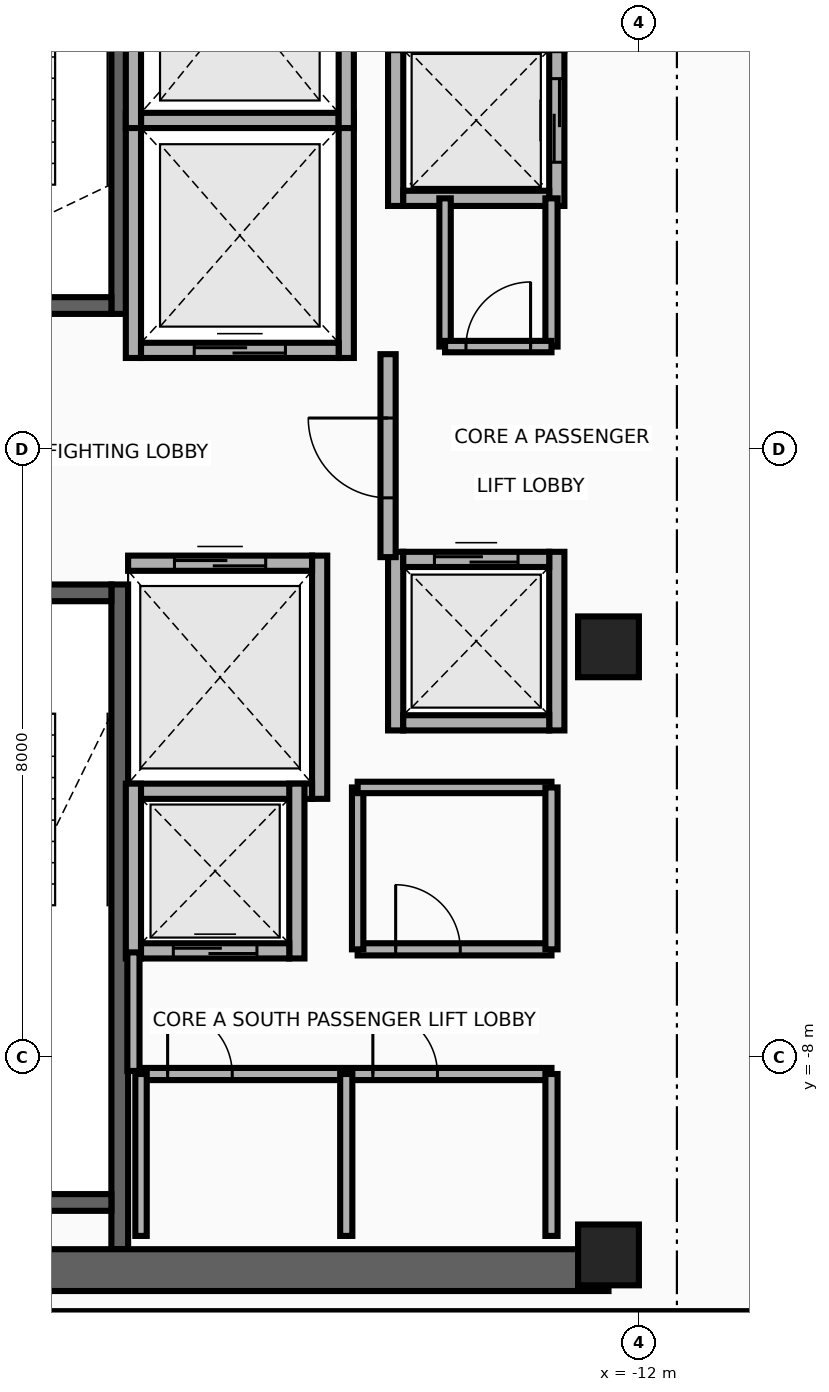
"""IFC4 building model, lengths in metres.
Left out: names, types, materials, properties, quantities, classifications, styles, units other than length and angle.
Written with IfcOpenShell. Run it as: python <this file> out.ifc"""

import sys

from ifc_helpers import new_model, si_unit, direction, frame, frame_2d, origin, origin_2d, place, context, subcontext, project, spatial, rectangle, extrude, source, transform, mapped, element, fill, save


model = new_model("IFC4")
c1 = context("Model", 3, precision=1e-05, world=origin(), true_north=direction((0.0, 1.0)))
c2 = subcontext(c1, "Body", "Model", "MODEL_VIEW")
j1 = project(units=[si_unit("LENGTHUNIT", "METRE"), si_unit("PLANEANGLEUNIT", "RADIAN")], contexts=[c1])
p1 = place(None, origin())
s1 = spatial("IfcSite", under=j1, at=p1, CompositionType="ELEMENT")
p2 = place(p1, origin())
s2 = spatial("IfcBuilding", under=s1, at=p2, CompositionType="ELEMENT")
p3 = place(p2, frame((0.0, 0.0, 266.0)))
s3 = spatial("IfcBuildingStorey", under=s2, at=p3, CompositionType="ELEMENT", Elevation=266.0)
p4 = place(p3, frame((-18.83, 1.78, 0.0), z_axis=(0.0, 0.0, 1.0), x_axis=(0.0, 1.0, 0.0)))
e1 = element("IfcWall", 1, at=p4, inside=s3, PredefinedType="SHEAR", context=c2, shape_type="SweptSolid", body=[
    extrude(rectangle(XDim=8.745, YDim=0.22, at=frame_2d((4.373, 0.0))), origin(), (0.0, 0.0, 1.0), 3.26),
])
p5 = place(p3, frame((-22.05, 1.89, 0.0), z_axis=(0.0, 0.0, 1.0), x_axis=(1.0, 0.0, 0.0)))
e2 = element("IfcWall", 2, at=p5, inside=s3, PredefinedType="SHEAR", context=c2, shape_type="SweptSolid", body=[
    extrude(rectangle(XDim=3.11, YDim=0.22, at=frame_2d((1.555, 0.0))), origin(), (0.0, 0.0, 1.0), 3.26),
])
p6 = place(p5, frame((1.0, 0.0, 0.0)))
e3 = element("IfcOpeningElement", 3, at=p6, cuts=e2, PredefinedType="OPENING", context=c2, shape_type="SweptSolid", body=[
    extrude(rectangle(XDim=1.1, YDim=2.15, at=frame_2d((0.55, 1.075))), frame((0.0, 0.125, 0.0), z_axis=(0.0, -1.0, 0.0), x_axis=(1.0, 0.0, 0.0)), (0.0, 0.0, 1.0), 0.25),
])
p7 = place(p3, frame((-18.83, -10.525, 0.0), z_axis=(0.0, 0.0, 1.0), x_axis=(0.0, 1.0, 0.0)))
e4 = element("IfcWall", 4, at=p7, inside=s3, PredefinedType="SHEAR", context=c2, shape_type="SweptSolid", body=[
    extrude(rectangle(XDim=8.745, YDim=0.22, at=frame_2d((4.373, 0.0))), origin(), (0.0, 0.0, 1.0), 3.26),
])
p8 = place(p3, frame((-22.05, -9.91, 0.0), z_axis=(0.0, 0.0, 1.0), x_axis=(1.0, 0.0, 0.0)))
e5 = element("IfcWall", 5, at=p8, inside=s3, PredefinedType="SHEAR", context=c2, shape_type="SweptSolid", body=[
    extrude(rectangle(XDim=3.11, YDim=0.22, at=frame_2d((1.555, 0.0))), origin(), (0.0, 0.0, 1.0), 3.26),
])
p9 = place(p3, frame((-22.05, -1.89, 0.0), z_axis=(0.0, 0.0, 1.0), x_axis=(1.0, 0.0, 0.0)))
e6 = element("IfcWall", 6, at=p9, inside=s3, PredefinedType="SHEAR", context=c2, shape_type="SweptSolid", body=[
    extrude(rectangle(XDim=3.11, YDim=0.22, at=frame_2d((1.555, 0.0))), origin(), (0.0, 0.0, 1.0), 3.26),
])
p10 = place(p9, frame((1.0, 0.0, 0.0)))
e7 = element("IfcOpeningElement", 7, at=p10, cuts=e6, PredefinedType="OPENING", context=c2, shape_type="SweptSolid", body=[
    extrude(rectangle(XDim=1.1, YDim=2.15, at=frame_2d((0.55, 1.075))), frame((0.0, 0.125, 0.0), z_axis=(0.0, -1.0, 0.0), x_axis=(1.0, 0.0, 0.0)), (0.0, 0.0, 1.0), 0.25),
])
p11 = place(p3, frame((-22.65, -10.8, 0.0), z_axis=(0.0, 0.0, 1.0), x_axis=(1.0, 0.0, 0.0)))
e8 = element("IfcWall", 8, at=p11, inside=s3, PredefinedType="SHEAR", context=c2, shape_type="SweptSolid", body=[
    extrude(rectangle(XDim=10.25, YDim=0.55, at=frame_2d((5.125, 0.0))), origin(), (0.0, 0.0, 1.0), 3.26),
])
m1 = source(origin(), c2, "Body", "SweptSolid", [
    extrude(rectangle(XDim=0.8, YDim=0.8, at=origin_2d()), origin(), (0.0, 0.0, 1.0), 3.5),
])
for number, where, z_axis, x_axis in (
    (9, (-12.4, -10.6, 0.0), (0.0, 0.0, 1.0), (1.0, 0.0, 0.0)),
    (10, (-12.4, -2.6, 0.0), (0.0, 0.0, 1.0), (1.0, 0.0, 0.0)),
):
    element("IfcColumn", number, at=place(p3, frame(where, z_axis=z_axis, x_axis=x_axis)), inside=s3, PredefinedType="COLUMN", context=c2, shape_type="MappedRepresentation", body=[
        mapped(m1, transform((0.0, 0.0, 0.0), x_axis=(1.0, 0.0, 0.0), y_axis=(0.0, 1.0, 0.0), z_axis=(0.0, 0.0, 1.0), scale=1.0)),
    ])
for number, where, z_axis, x_axis in (
    (11, (-18.65, 1.2, 0.0), (0.0, 0.0, 1.0), (0.0, 1.0, 0.0)),
    (12, (-15.85, 1.2, 0.0), (0.0, 0.0, 1.0), (0.0, 1.0, 0.0)),
):
    element("IfcWall", number, at=place(p3, frame(where, z_axis=z_axis, x_axis=x_axis)), inside=s3, PredefinedType="MOVABLE", context=c2, shape_type="SweptSolid", body=[
        extrude(rectangle(XDim=3.225, YDim=0.2, at=frame_2d((1.613, 0.0))), origin(), (0.0, 0.0, 1.0), 3.26),
    ])
p12 = place(p3, frame((-18.55, 1.3, 0.0), z_axis=(0.0, 0.0, 1.0), x_axis=(1.0, 0.0, 0.0)))
e13 = element("IfcWall", 13, at=p12, inside=s3, PredefinedType="MOVABLE", context=c2, shape_type="SweptSolid", body=[
    extrude(rectangle(XDim=2.6, YDim=0.2, at=frame_2d((1.3, 0.0))), origin(), (0.0, 0.0, 1.0), 3.26),
])
p13 = place(p12, frame((0.7, 0.0, 0.0)))
e14 = element("IfcOpeningElement", 14, at=p13, cuts=e13, PredefinedType="OPENING", context=c2, shape_type="SweptSolid", body=[
    extrude(rectangle(XDim=1.2, YDim=2.1, at=frame_2d((0.6, 1.05))), frame((0.0, 0.115, 0.0), z_axis=(0.0, -1.0, 0.0), x_axis=(1.0, 0.0, 0.0)), (0.0, 0.0, 1.0), 0.23),
])
p14 = place(p3, frame((-18.55, 4.325, 0.0), z_axis=(0.0, 0.0, 1.0), x_axis=(1.0, 0.0, 0.0)))
e15 = element("IfcWall", 15, at=p14, inside=s3, PredefinedType="MOVABLE", context=c2, shape_type="SweptSolid", body=[
    extrude(rectangle(XDim=2.6, YDim=0.2, at=frame_2d((1.3, 0.0))), origin(), (0.0, 0.0, 1.0), 3.26),
])
p15 = place(p3, frame((-16.2, -4.6, 0.0), z_axis=(0.0, 0.0, 1.0), x_axis=(0.0, 1.0, 0.0)))
e16 = element("IfcWall", 16, at=p15, inside=s3, PredefinedType="MOVABLE", context=c2, shape_type="SweptSolid", body=[
    extrude(rectangle(XDim=3.2, YDim=0.2, at=frame_2d((1.6, 0.0))), origin(), (0.0, 0.0, 1.0), 3.26),
])
p16 = place(p3, frame((-18.72, -4.5, 0.0), z_axis=(0.0, 0.0, 1.0), x_axis=(1.0, 0.0, 0.0)))
e17 = element("IfcWall", 17, at=p16, inside=s3, PredefinedType="MOVABLE", context=c2, shape_type="SweptSolid", body=[
    extrude(rectangle(XDim=2.42, YDim=0.2, at=frame_2d((1.21, 0.0))), origin(), (0.0, 0.0, 1.0), 3.26),
])
p17 = place(p3, frame((-18.72, -1.5, 0.0), z_axis=(0.0, 0.0, 1.0), x_axis=(1.0, 0.0, 0.0)))
e18 = element("IfcWall", 18, at=p17, inside=s3, PredefinedType="MOVABLE", context=c2, shape_type="SweptSolid", body=[
    extrude(rectangle(XDim=2.42, YDim=0.2, at=frame_2d((1.21, 0.0))), origin(), (0.0, 0.0, 1.0), 3.26),
])
p18 = place(p17, frame((0.61, 0.0, 0.0)))
e19 = element("IfcOpeningElement", 19, at=p18, cuts=e18, PredefinedType="OPENING", context=c2, shape_type="SweptSolid", body=[
    extrude(rectangle(XDim=1.2, YDim=2.1, at=frame_2d((0.6, 1.05))), frame((0.0, 0.115, 0.0), z_axis=(0.0, -1.0, 0.0), x_axis=(1.0, 0.0, 0.0)), (0.0, 0.0, 1.0), 0.23),
])
for number, where, z_axis, x_axis in (
    (20, (-18.65, 4.225, 0.0), (0.0, 0.0, 1.0), (0.0, 1.0, 0.0)),
    (21, (-15.85, 4.225, 0.0), (0.0, 0.0, 1.0), (0.0, 1.0, 0.0)),
):
    element("IfcWall", number, at=place(p3, frame(where, z_axis=z_axis, x_axis=x_axis)), inside=s3, PredefinedType="MOVABLE", context=c2, shape_type="SweptSolid", body=[
        extrude(rectangle(XDim=3.325, YDim=0.2, at=frame_2d((1.663, 0.0))), origin(), (0.0, 0.0, 1.0), 3.26),
    ])
p19 = place(p3, frame((-15.2, 3.2, 0.0), z_axis=(0.0, 0.0, 1.0), x_axis=(0.0, 1.0, 0.0)))
e22 = element("IfcWall", 22, at=p19, inside=s3, PredefinedType="MOVABLE", context=c2, shape_type="SweptSolid", body=[
    extrude(rectangle(XDim=2.25, YDim=0.2, at=frame_2d((1.125, 0.0))), origin(), (0.0, 0.0, 1.0), 3.26),
])
p20 = place(p3, frame((-13.08, 3.2, 0.0), z_axis=(0.0, 0.0, 1.0), x_axis=(0.0, 1.0, 0.0)))
e23 = element("IfcWall", 23, at=p20, inside=s3, PredefinedType="MOVABLE", context=c2, shape_type="SweptSolid", body=[
    extrude(rectangle(XDim=2.25, YDim=0.2, at=frame_2d((1.125, 0.0))), origin(), (0.0, 0.0, 1.0), 3.26),
])
p21 = place(p20, frame((0.575, 0.0, 0.0)))
e24 = element("IfcOpeningElement", 24, at=p21, cuts=e23, PredefinedType="OPENING", context=c2, shape_type="SweptSolid", body=[
    extrude(rectangle(XDim=1.1, YDim=2.1, at=frame_2d((0.55, 1.05))), frame((0.0, 0.115, 0.0), z_axis=(0.0, -1.0, 0.0), x_axis=(1.0, 0.0, 0.0)), (0.0, 0.0, 1.0), 0.23),
])
p22 = place(p3, frame((-15.1, 3.3, 0.0), z_axis=(0.0, 0.0, 1.0), x_axis=(1.0, 0.0, 0.0)))
e25 = element("IfcWall", 25, at=p22, inside=s3, PredefinedType="MOVABLE", context=c2, shape_type="SweptSolid", body=[
    extrude(rectangle(XDim=1.92, YDim=0.2, at=frame_2d((0.96, 0.0))), origin(), (0.0, 0.0, 1.0), 3.26),
])
for number, where, z_axis, x_axis in (
    (26, (-18.65, -6.7, 0.0), (0.0, 0.0, 1.0), (0.0, 1.0, 0.0)),
    (27, (-16.5, -6.7, 0.0), (0.0, 0.0, 1.0), (0.0, 1.0, 0.0)),
):
    element("IfcWall", number, at=place(p3, frame(where, z_axis=z_axis, x_axis=x_axis)), inside=s3, PredefinedType="MOVABLE", context=c2, shape_type="SweptSolid", body=[
        extrude(rectangle(XDim=2.3, YDim=0.2, at=frame_2d((1.15, 0.0))), origin(), (0.0, 0.0, 1.0), 3.26),
    ])
p23 = place(p3, frame((-18.55, -6.6, 0.0), z_axis=(0.0, 0.0, 1.0), x_axis=(1.0, 0.0, 0.0)))
e28 = element("IfcWall", 28, at=p23, inside=s3, PredefinedType="MOVABLE", context=c2, shape_type="SweptSolid", body=[
    extrude(rectangle(XDim=1.95, YDim=0.2, at=frame_2d((0.975, 0.0))), origin(), (0.0, 0.0, 1.0), 3.26),
])
p24 = place(p23, frame((0.425, 0.0, 0.0)))
e29 = element("IfcOpeningElement", 29, at=p24, cuts=e28, PredefinedType="OPENING", context=c2, shape_type="SweptSolid", body=[
    extrude(rectangle(XDim=1.1, YDim=2.1, at=frame_2d((0.55, 1.05))), frame((0.0, 0.115, 0.0), z_axis=(0.0, -1.0, 0.0), x_axis=(1.0, 0.0, 0.0)), (0.0, 0.0, 1.0), 0.23),
])
for number, where, z_axis, x_axis in (
    (30, (-15.2, -3.7, 0.0), (0.0, 0.0, 1.0), (0.0, 1.0, 0.0)),
    (31, (-13.08, -3.7, 0.0), (0.0, 0.0, 1.0), (0.0, 1.0, 0.0)),
):
    element("IfcWall", number, at=place(p3, frame(where, z_axis=z_axis, x_axis=x_axis)), inside=s3, PredefinedType="MOVABLE", context=c2, shape_type="SweptSolid", body=[
        extrude(rectangle(XDim=2.35, YDim=0.2, at=frame_2d((1.175, 0.0))), origin(), (0.0, 0.0, 1.0), 3.26),
    ])
p25 = place(p3, frame((-15.1, -3.6, 0.0), z_axis=(0.0, 0.0, 1.0), x_axis=(1.0, 0.0, 0.0)))
e32 = element("IfcWall", 32, at=p25, inside=s3, PredefinedType="MOVABLE", context=c2, shape_type="SweptSolid", body=[
    extrude(rectangle(XDim=1.92, YDim=0.2, at=frame_2d((0.96, 0.0))), origin(), (0.0, 0.0, 1.0), 3.26),
])
p26 = place(p3, frame((-15.1, -1.45, 0.0), z_axis=(0.0, 0.0, 1.0), x_axis=(1.0, 0.0, 0.0)))
e33 = element("IfcWall", 33, at=p26, inside=s3, PredefinedType="MOVABLE", context=c2, shape_type="SweptSolid", body=[
    extrude(rectangle(XDim=1.92, YDim=0.2, at=frame_2d((0.96, 0.0))), origin(), (0.0, 0.0, 1.0), 3.26),
])
p27 = place(p26, frame((0.41, 0.0, 0.0)))
e34 = element("IfcOpeningElement", 34, at=p27, cuts=e33, PredefinedType="OPENING", context=c2, shape_type="SweptSolid", body=[
    extrude(rectangle(XDim=1.1, YDim=2.1, at=frame_2d((0.55, 1.05))), frame((0.0, 0.115, 0.0), z_axis=(0.0, -1.0, 0.0), x_axis=(1.0, 0.0, 0.0)), (0.0, 0.0, 1.0), 0.23),
])
p28 = place(p3, frame((-15.3, -1.42, 0.0), z_axis=(0.0, 0.0, 1.0), x_axis=(0.0, 1.0, 0.0)))
e35 = element("IfcWall", 35, at=p28, inside=s3, PredefinedType="PARTITIONING", context=c2, shape_type="SweptSolid", body=[
    extrude(rectangle(XDim=2.67, YDim=0.2, at=frame_2d((1.335, 0.0))), origin(), (0.0, 0.0, 1.0), 3.26),
])
p29 = place(p28, frame((0.78, 0.0, 0.0)))
e36 = element("IfcOpeningElement", 36, at=p29, cuts=e35, PredefinedType="OPENING", context=c2, shape_type="SweptSolid", body=[
    extrude(rectangle(XDim=1.05, YDim=2.15, at=frame_2d((0.525, 1.075))), frame((0.0, 0.115, 0.0), z_axis=(0.0, -1.0, 0.0), x_axis=(1.0, 0.0, 0.0)), (0.0, 0.0, 1.0), 0.23),
])
p30 = place(p3, frame((-18.65, -8.18, 0.0), z_axis=(0.0, 0.0, 1.0), x_axis=(0.0, 1.0, 0.0)))
e37 = element("IfcWall", 37, at=p30, inside=s3, PredefinedType="PARTITIONING", context=c2, shape_type="SweptSolid", body=[
    extrude(rectangle(XDim=1.56, YDim=0.16, at=frame_2d((0.78, 0.0))), origin(), (0.0, 0.0, 1.0), 3.26),
])
p31 = place(p3, frame((-18.55, -8.22, 0.0), z_axis=(0.0, 0.0, 1.0), x_axis=(1.0, 0.0, 0.0)))
e38 = element("IfcWall", 38, at=p31, inside=s3, PredefinedType="PARTITIONING", context=c2, shape_type="SweptSolid", body=[
    extrude(rectangle(XDim=5.4, YDim=0.16, at=frame_2d((2.7, 0.0))), origin(), (0.0, 0.0, 1.0), 3.26),
])
p32 = place(p31, frame((0.35, 0.0, 0.0)))
e39 = element("IfcOpeningElement", 39, at=p32, cuts=e38, PredefinedType="OPENING", context=c2, shape_type="SweptSolid", body=[
    extrude(rectangle(XDim=0.85, YDim=2.05, at=frame_2d((0.425, 1.025))), frame((0.0, 0.095, 0.0), z_axis=(0.0, -1.0, 0.0), x_axis=(1.0, 0.0, 0.0)), (0.0, 0.0, 1.0), 0.19),
])
p33 = place(p31, frame((3.05, 0.0, 0.0)))
e40 = element("IfcOpeningElement", 40, at=p33, cuts=e38, PredefinedType="OPENING", context=c2, shape_type="SweptSolid", body=[
    extrude(rectangle(XDim=0.85, YDim=2.05, at=frame_2d((0.425, 1.025))), frame((0.0, 0.095, 0.0), z_axis=(0.0, -1.0, 0.0), x_axis=(1.0, 0.0, 0.0)), (0.0, 0.0, 1.0), 0.19),
])
p34 = place(p3, frame((-18.55, -10.35, 0.0), z_axis=(0.0, 0.0, 1.0), x_axis=(0.0, 1.0, 0.0)))
e41 = element("IfcWall", 41, at=p34, inside=s3, PredefinedType="PARTITIONING", context=c2, shape_type="SweptSolid", body=[
    extrude(rectangle(XDim=2.13, YDim=0.15, at=frame_2d((1.065, 0.0))), origin(), (0.0, 0.0, 1.0), 3.26),
])
for number, where, z_axis, x_axis in (
    (42, (-13.15, -10.35, 0.0), (0.0, 0.0, 1.0), (0.0, 1.0, 0.0)),
    (43, (-15.85, -10.35, 0.0), (0.0, 0.0, 1.0), (0.0, 1.0, 0.0)),
):
    element("IfcWall", number, at=place(p3, frame(where, z_axis=z_axis, x_axis=x_axis)), inside=s3, PredefinedType="PARTITIONING", context=c2, shape_type="SweptSolid", body=[
        extrude(rectangle(XDim=2.13, YDim=0.16, at=frame_2d((1.065, 0.0))), origin(), (0.0, 0.0, 1.0), 3.26),
    ])
p35 = place(p3, frame((-15.7, -6.58, 0.0), z_axis=(0.0, 0.0, 1.0), x_axis=(1.0, 0.0, 0.0)))
e44 = element("IfcWall", 44, at=p35, inside=s3, PredefinedType="PARTITIONING", context=c2, shape_type="SweptSolid", body=[
    extrude(rectangle(XDim=2.55, YDim=0.16, at=frame_2d((1.275, 0.0))), origin(), (0.0, 0.0, 1.0), 3.26),
])
p36 = place(p35, frame((0.5, 0.0, 0.0)))
e45 = element("IfcOpeningElement", 45, at=p36, cuts=e44, PredefinedType="OPENING", context=c2, shape_type="SweptSolid", body=[
    extrude(rectangle(XDim=0.85, YDim=2.05, at=frame_2d((0.425, 1.025))), frame((0.0, 0.095, 0.0), z_axis=(0.0, -1.0, 0.0), x_axis=(1.0, 0.0, 0.0)), (0.0, 0.0, 1.0), 0.19),
])
p37 = place(p3, frame((-15.7, -6.58, 0.0), z_axis=(0.0, 0.0, 1.0), x_axis=(0.0, 1.0, 0.0)))
e46 = element("IfcWall", 46, at=p37, inside=s3, PredefinedType="PARTITIONING", context=c2, shape_type="SweptSolid", body=[
    extrude(rectangle(XDim=2.13, YDim=0.15, at=frame_2d((1.065, 0.0))), origin(), (0.0, 0.0, 1.0), 3.26),
])
p38 = place(p3, frame((-15.7, -4.45, 0.0), z_axis=(0.0, 0.0, 1.0), x_axis=(1.0, 0.0, 0.0)))
e47 = element("IfcWall", 47, at=p38, inside=s3, PredefinedType="PARTITIONING", context=c2, shape_type="SweptSolid", body=[
    extrude(rectangle(XDim=2.55, YDim=0.15, at=frame_2d((1.275, 0.0))), origin(), (0.0, 0.0, 1.0), 3.26),
])
p39 = place(p3, frame((-13.15, -6.58, 0.0), z_axis=(0.0, 0.0, 1.0), x_axis=(0.0, 1.0, 0.0)))
e48 = element("IfcWall", 48, at=p39, inside=s3, PredefinedType="PARTITIONING", context=c2, shape_type="SweptSolid", body=[
    extrude(rectangle(XDim=2.13, YDim=0.16, at=frame_2d((1.065, 0.0))), origin(), (0.0, 0.0, 1.0), 3.26),
])
p40 = place(p3, frame((-13.15, 1.35, 0.0), z_axis=(0.0, 0.0, 1.0), x_axis=(0.0, 1.0, 0.0)))
e49 = element("IfcWall", 49, at=p40, inside=s3, PredefinedType="PARTITIONING", context=c2, shape_type="SweptSolid", body=[
    extrude(rectangle(XDim=1.95, YDim=0.16, at=frame_2d((0.975, 0.0))), origin(), (0.0, 0.0, 1.0), 3.26),
])
p41 = place(p3, frame((-14.55, 1.35, 0.0), z_axis=(0.0, 0.0, 1.0), x_axis=(0.0, 1.0, 0.0)))
e50 = element("IfcWall", 50, at=p41, inside=s3, PredefinedType="PARTITIONING", context=c2, shape_type="SweptSolid", body=[
    extrude(rectangle(XDim=1.95, YDim=0.15, at=frame_2d((0.975, 0.0))), origin(), (0.0, 0.0, 1.0), 3.26),
])
p42 = place(p3, frame((-14.55, 1.35, 0.0), z_axis=(0.0, 0.0, 1.0), x_axis=(1.0, 0.0, 0.0)))
e51 = element("IfcWall", 51, at=p42, inside=s3, PredefinedType="PARTITIONING", context=c2, shape_type="SweptSolid", body=[
    extrude(rectangle(XDim=1.4, YDim=0.15, at=frame_2d((0.7, 0.0))), origin(), (0.0, 0.0, 1.0), 3.26),
])
p43 = place(p42, frame((0.275, 0.0, 0.0)))
e52 = element("IfcOpeningElement", 52, at=p43, cuts=e51, PredefinedType="OPENING", context=c2, shape_type="SweptSolid", body=[
    extrude(rectangle(XDim=0.85, YDim=2.05, at=frame_2d((0.425, 1.025))), frame((0.0, 0.09, 0.0), z_axis=(0.0, -1.0, 0.0), x_axis=(1.0, 0.0, 0.0)), (0.0, 0.0, 1.0), 0.18),
])
p44 = place(p3, frame((-23.45, -11.42, 0.0), z_axis=(0.0, 0.0, 1.0), x_axis=(1.0, 0.0, 0.0)))
e53 = element("IfcWall", 53, at=p44, inside=s3, PredefinedType="PARTITIONING", context=c2, shape_type="SweptSolid", body=[
    extrude(rectangle(XDim=13.84, YDim=0.16, at=frame_2d((6.92, 0.0))), origin(), (0.0, 0.0, 1.0), 2.634),
])
p45 = place(p13, origin())
e54 = element("IfcDoor", 54, at=p45, inside=s3, OperationType="DOUBLE_DOOR_SLIDING", PredefinedType="DOOR", context=c2, shape_type="SweptSolid", body=[
    extrude(rectangle(XDim=1.2, YDim=2.1, at=frame_2d((0.6, 1.05))), frame((0.0, 0.025, 0.0), z_axis=(0.0, -1.0, 0.0), x_axis=(1.0, 0.0, 0.0)), (0.0, 0.0, 1.0), 0.05),
])
fill(e14, e54)
p46 = place(p18, origin())
e55 = element("IfcDoor", 55, at=p46, inside=s3, OperationType="DOUBLE_DOOR_SLIDING", PredefinedType="DOOR", context=c2, shape_type="SweptSolid", body=[
    extrude(rectangle(XDim=1.2, YDim=2.1, at=frame_2d((0.6, 1.05))), frame((0.0, 0.025, 0.0), z_axis=(0.0, -1.0, 0.0), x_axis=(1.0, 0.0, 0.0)), (0.0, 0.0, 1.0), 0.05),
])
fill(e19, e55)
p47 = place(p21, origin())
e56 = element("IfcDoor", 56, at=p47, inside=s3, OperationType="DOUBLE_DOOR_SLIDING", PredefinedType="DOOR", context=c2, shape_type="SweptSolid", body=[
    extrude(rectangle(XDim=1.1, YDim=2.1, at=frame_2d((0.55, 1.05))), frame((0.0, 0.025, 0.0), z_axis=(0.0, -1.0, 0.0), x_axis=(1.0, 0.0, 0.0)), (0.0, 0.0, 1.0), 0.05),
])
fill(e24, e56)
p48 = place(p24, origin())
e57 = element("IfcDoor", 57, at=p48, inside=s3, OperationType="DOUBLE_DOOR_SLIDING", PredefinedType="DOOR", context=c2, shape_type="SweptSolid", body=[
    extrude(rectangle(XDim=1.1, YDim=2.1, at=frame_2d((0.55, 1.05))), frame((0.0, 0.025, 0.0), z_axis=(0.0, -1.0, 0.0), x_axis=(1.0, 0.0, 0.0)), (0.0, 0.0, 1.0), 0.05),
])
fill(e29, e57)
p49 = place(p27, origin())
e58 = element("IfcDoor", 58, at=p49, inside=s3, OperationType="DOUBLE_DOOR_SLIDING", PredefinedType="DOOR", context=c2, shape_type="SweptSolid", body=[
    extrude(rectangle(XDim=1.1, YDim=2.1, at=frame_2d((0.55, 1.05))), frame((0.0, 0.025, 0.0), z_axis=(0.0, -1.0, 0.0), x_axis=(1.0, 0.0, 0.0)), (0.0, 0.0, 1.0), 0.05),
])
fill(e34, e58)
p50 = place(p29, origin())
e59 = element("IfcDoor", 59, at=p50, inside=s3, OperationType="SINGLE_SWING_RIGHT", PredefinedType="DOOR", context=c2, shape_type="SweptSolid", body=[
    extrude(rectangle(XDim=1.05, YDim=2.15, at=frame_2d((0.525, 1.075))), frame((0.0, 0.025, 0.0), z_axis=(0.0, -1.0, 0.0), x_axis=(1.0, 0.0, 0.0)), (0.0, 0.0, 1.0), 0.05),
])
fill(e36, e59)
p51 = place(p32, origin())
e60 = element("IfcDoor", 60, at=p51, inside=s3, OperationType="SINGLE_SWING_RIGHT", PredefinedType="DOOR", context=c2, shape_type="SweptSolid", body=[
    extrude(rectangle(XDim=0.85, YDim=2.05, at=frame_2d((0.425, 1.025))), frame((0.0, 0.025, 0.0), z_axis=(0.0, -1.0, 0.0), x_axis=(1.0, 0.0, 0.0)), (0.0, 0.0, 1.0), 0.05),
])
fill(e39, e60)
p52 = place(p33, origin())
e61 = element("IfcDoor", 61, at=p52, inside=s3, OperationType="SINGLE_SWING_LEFT", PredefinedType="DOOR", context=c2, shape_type="SweptSolid", body=[
    extrude(rectangle(XDim=0.85, YDim=2.05, at=frame_2d((0.425, 1.025))), frame((0.0, 0.025, 0.0), z_axis=(0.0, -1.0, 0.0), x_axis=(1.0, 0.0, 0.0)), (0.0, 0.0, 1.0), 0.05),
])
fill(e40, e61)
p53 = place(p36, origin())
e62 = element("IfcDoor", 62, at=p53, inside=s3, OperationType="SINGLE_SWING_RIGHT", PredefinedType="DOOR", context=c2, shape_type="SweptSolid", body=[
    extrude(rectangle(XDim=0.85, YDim=2.05, at=frame_2d((0.425, 1.025))), frame((0.0, 0.025, 0.0), z_axis=(0.0, -1.0, 0.0), x_axis=(1.0, 0.0, 0.0)), (0.0, 0.0, 1.0), 0.05),
])
fill(e45, e62)
p54 = place(p43, origin())
e63 = element("IfcDoor", 63, at=p54, inside=s3, OperationType="SINGLE_SWING_LEFT", PredefinedType="DOOR", context=c2, shape_type="SweptSolid", body=[
    extrude(rectangle(XDim=0.85, YDim=2.05, at=frame_2d((0.425, 1.025))), frame((0.0, 0.025, 0.0), z_axis=(0.0, -1.0, 0.0), x_axis=(1.0, 0.0, 0.0)), (0.0, 0.0, 1.0), 0.05),
])
fill(e52, e63)
save(model, sys.argv[1])
